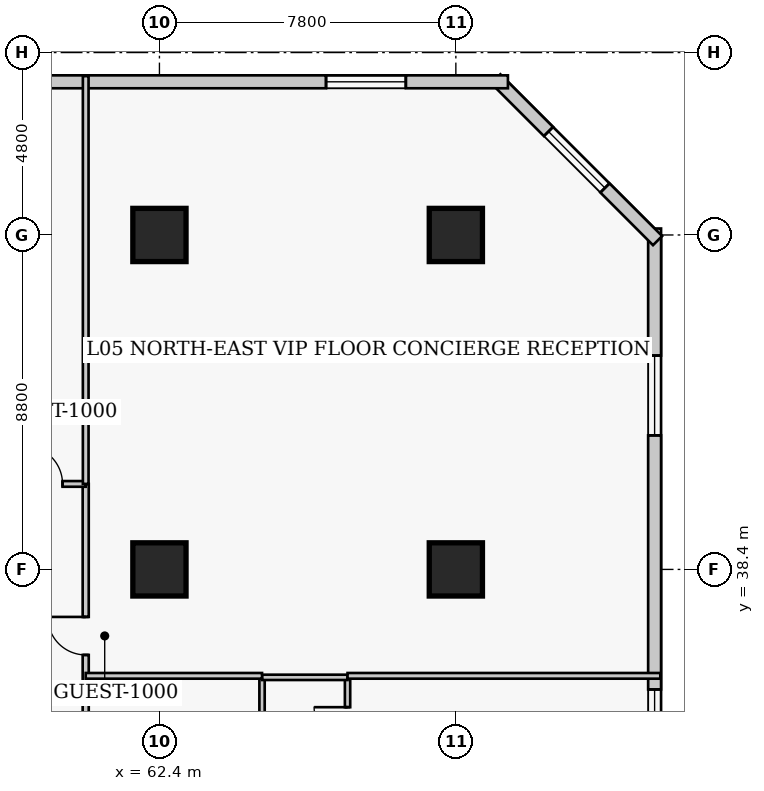
"""IFC4 building model, lengths in metres.
Left out: names, types, materials, properties, quantities, classifications, styles, units other than length and angle.
Written with IfcOpenShell. Run it as: python <this file> out.ifc"""

import sys

from ifc_helpers import new_model, si_unit, direction, frame, frame_2d, origin, origin_2d, place, context, subcontext, project, spatial, rectangle, extrude, element, fill, save


model = new_model("IFC4")
c1 = context("Model", 3, precision=1e-05, world=origin(), true_north=direction((0.0, 1.0)))
c2 = subcontext(c1, "Body", "Model", "MODEL_VIEW")
j1 = project(units=[si_unit("LENGTHUNIT", "METRE"), si_unit("PLANEANGLEUNIT", "RADIAN")], contexts=[c1])
p1 = place(None, origin())
s1 = spatial("IfcSite", under=j1, at=p1, CompositionType="ELEMENT")
p2 = place(p1, origin())
s2 = spatial("IfcBuilding", under=s1, at=p2, CompositionType="ELEMENT")
p3 = place(p2, frame((0.0, 0.0, 26.0)))
s3 = spatial("IfcBuildingStorey", under=s2, at=p3, CompositionType="ELEMENT", Elevation=26.0)
for number, where, z_axis, x_axis in (
    (1, (62.4, 38.4, 0.0), (0.0, 0.0, 1.0), (1.0, 0.0, 0.0)),
    (2, (62.4, 47.2, 0.0), (0.0, 0.0, 1.0), (1.0, 0.0, 0.0)),
    (3, (70.2, 38.4, 0.0), (0.0, 0.0, 1.0), (1.0, 0.0, 0.0)),
    (4, (70.2, 47.2, 0.0), (0.0, 0.0, 1.0), (1.0, 0.0, 0.0)),
):
    element("IfcColumn", number, at=place(p3, frame(where, z_axis=z_axis, x_axis=x_axis)), inside=s3, PredefinedType="COLUMN", context=c2, shape_type="SweptSolid", body=[
        extrude(rectangle(XDim=1.4, YDim=1.4, at=origin_2d()), origin(), (0.0, 0.0, 1.0), 3.8),
    ])
p4 = place(p3, frame((75.43, 12.23, 0.0), z_axis=(0.0, 0.0, 1.0), x_axis=(0.0, 1.0, 0.0)))
e5 = element("IfcWall", 5, at=p4, inside=s3, PredefinedType="SOLIDWALL", context=c2, shape_type="SweptSolid", body=[
    extrude(rectangle(XDim=35.14, YDim=0.34, at=frame_2d((17.57, 0.0))), origin(), (0.0, 0.0, 1.0), 3.54),
])
p5 = place(p4, frame((3.343, 0.0, 0.85)))
e6 = element("IfcOpeningElement", 6, at=p5, cuts=e5, PredefinedType="OPENING", context=c2, shape_type="SweptSolid", body=[
    extrude(rectangle(XDim=2.1, YDim=1.85, at=frame_2d((1.05, 0.925))), frame((0.0, 0.18, 0.0), z_axis=(0.0, -1.0, 0.0), x_axis=(1.0, 0.0, 0.0)), (0.0, 0.0, 1.0), 0.36),
])
p6 = place(p4, frame((12.127, 0.0, 0.85)))
e7 = element("IfcOpeningElement", 7, at=p6, cuts=e5, PredefinedType="OPENING", context=c2, shape_type="SweptSolid", body=[
    extrude(rectangle(XDim=2.1, YDim=1.85, at=frame_2d((1.05, 0.925))), frame((0.0, 0.18, 0.0), z_axis=(0.0, -1.0, 0.0), x_axis=(1.0, 0.0, 0.0)), (0.0, 0.0, 1.0), 0.36),
])
p7 = place(p4, frame((20.913, 0.0, 0.85)))
e8 = element("IfcOpeningElement", 8, at=p7, cuts=e5, PredefinedType="OPENING", context=c2, shape_type="SweptSolid", body=[
    extrude(rectangle(XDim=2.1, YDim=1.85, at=frame_2d((1.05, 0.925))), frame((0.0, 0.18, 0.0), z_axis=(0.0, -1.0, 0.0), x_axis=(1.0, 0.0, 0.0)), (0.0, 0.0, 1.0), 0.36),
])
p8 = place(p4, frame((29.698, 0.0, 0.85)))
e9 = element("IfcOpeningElement", 9, at=p8, cuts=e5, PredefinedType="OPENING", context=c2, shape_type="SweptSolid", body=[
    extrude(rectangle(XDim=2.1, YDim=1.85, at=frame_2d((1.05, 0.925))), frame((0.0, 0.18, 0.0), z_axis=(0.0, -1.0, 0.0), x_axis=(1.0, 0.0, 0.0)), (0.0, 0.0, 1.0), 0.36),
])
p9 = place(p3, frame((75.508, 47.052, 0.0), z_axis=(0.0, 0.0, 1.0), x_axis=(-0.707106781187, 0.707106781187, 0.0)))
e10 = element("IfcWall", 10, at=p9, inside=s3, PredefinedType="SOLIDWALL", context=c2, shape_type="SweptSolid", body=[
    extrude(rectangle(XDim=6.02, YDim=0.34, at=frame_2d((3.01, 0.0))), origin(), (0.0, 0.0, 1.0), 3.54),
])
p10 = place(p9, frame((1.96, 0.0, 0.85)))
e11 = element("IfcOpeningElement", 11, at=p10, cuts=e10, PredefinedType="OPENING", context=c2, shape_type="SweptSolid", body=[
    extrude(rectangle(XDim=2.1, YDim=1.85, at=frame_2d((1.05, 0.925))), frame((0.0, 0.18, 0.0), z_axis=(0.0, -1.0, 0.0), x_axis=(1.0, 0.0, 0.0)), (0.0, 0.0, 1.0), 0.36),
])
p11 = place(p3, frame((71.57, 51.23, 0.0), z_axis=(0.0, 0.0, 1.0), x_axis=(-1.0, 0.0, 0.0)))
e12 = element("IfcWall", 12, at=p11, inside=s3, PredefinedType="SOLIDWALL", context=c2, shape_type="SweptSolid", body=[
    extrude(rectangle(XDim=29.89, YDim=0.34, at=frame_2d((14.945, 0.0))), origin(), (0.0, 0.0, 1.0), 3.54),
])
p12 = place(p11, frame((2.686, 0.0, 0.85)))
e13 = element("IfcOpeningElement", 13, at=p12, cuts=e12, PredefinedType="OPENING", context=c2, shape_type="SweptSolid", body=[
    extrude(rectangle(XDim=2.1, YDim=1.85, at=frame_2d((1.05, 0.925))), frame((0.0, 0.18, 0.0), z_axis=(0.0, -1.0, 0.0), x_axis=(1.0, 0.0, 0.0)), (0.0, 0.0, 1.0), 0.36),
])
p13 = place(p11, frame((17.631, 0.0, 0.85)))
e14 = element("IfcOpeningElement", 14, at=p13, cuts=e12, PredefinedType="OPENING", context=c2, shape_type="SweptSolid", body=[
    extrude(rectangle(XDim=2.1, YDim=1.85, at=frame_2d((1.05, 0.925))), frame((0.0, 0.18, 0.0), z_axis=(0.0, -1.0, 0.0), x_axis=(1.0, 0.0, 0.0)), (0.0, 0.0, 1.0), 0.36),
])
p14 = place(p11, frame((25.104, 0.0, 0.85)))
e15 = element("IfcOpeningElement", 15, at=p14, cuts=e12, PredefinedType="OPENING", context=c2, shape_type="SweptSolid", body=[
    extrude(rectangle(XDim=2.1, YDim=1.85, at=frame_2d((1.05, 0.925))), frame((0.0, 0.18, 0.0), z_axis=(0.0, -1.0, 0.0), x_axis=(1.0, 0.0, 0.0)), (0.0, 0.0, 1.0), 0.36),
])
p15 = place(p3, frame((60.46, 10.25, 0.0), z_axis=(0.0, 0.0, 1.0), x_axis=(0.0, 1.0, 0.0)))
e16 = element("IfcWall", 16, at=p15, inside=s3, PredefinedType="PARTITIONING", context=c2, shape_type="SweptSolid", body=[
    extrude(rectangle(XDim=30.4, YDim=0.16, at=frame_2d((15.2, 0.0))), origin(), (0.0, 0.0, 1.0), 3.54),
])
p16 = place(p15, frame((4.4, 0.0, 0.0)))
e17 = element("IfcOpeningElement", 17, at=p16, cuts=e16, PredefinedType="OPENING", context=c2, shape_type="SweptSolid", body=[
    extrude(rectangle(XDim=0.95, YDim=2.1, at=frame_2d((0.475, 1.05))), frame((0.0, 0.09, 0.0), z_axis=(0.0, -1.0, 0.0), x_axis=(1.0, 0.0, 0.0)), (0.0, 0.0, 1.0), 0.18),
])
p17 = place(p15, frame((13.675, 0.0, 0.0)))
e18 = element("IfcOpeningElement", 18, at=p17, cuts=e16, PredefinedType="OPENING", context=c2, shape_type="SweptSolid", body=[
    extrude(rectangle(XDim=0.95, YDim=2.1, at=frame_2d((0.475, 1.05))), frame((0.0, 0.09, 0.0), z_axis=(0.0, -1.0, 0.0), x_axis=(1.0, 0.0, 0.0)), (0.0, 0.0, 1.0), 0.18),
])
p18 = place(p15, frame((21.475, 0.0, 0.0)))
e19 = element("IfcOpeningElement", 19, at=p18, cuts=e16, PredefinedType="OPENING", context=c2, shape_type="SweptSolid", body=[
    extrude(rectangle(XDim=0.95, YDim=2.1, at=frame_2d((0.475, 1.05))), frame((0.0, 0.09, 0.0), z_axis=(0.0, -1.0, 0.0), x_axis=(1.0, 0.0, 0.0)), (0.0, 0.0, 1.0), 0.18),
])
p19 = place(p15, frame((25.9, 0.0, 0.0)))
e20 = element("IfcOpeningElement", 20, at=p19, cuts=e16, PredefinedType="OPENING", context=c2, shape_type="SweptSolid", body=[
    extrude(rectangle(XDim=1.0, YDim=2.15, at=frame_2d((0.5, 1.075))), frame((0.0, 0.09, 0.0), z_axis=(0.0, -1.0, 0.0), x_axis=(1.0, 0.0, 0.0)), (0.0, 0.0, 1.0), 0.18),
])
p20 = place(p3, frame((56.8, 40.65, 0.0), z_axis=(0.0, 0.0, 1.0), x_axis=(1.0, 0.0, 0.0)))
e21 = element("IfcWall", 21, at=p20, inside=s3, PredefinedType="PARTITIONING", context=c2, shape_type="SweptSolid", body=[
    extrude(rectangle(XDim=3.66, YDim=0.15, at=frame_2d((1.83, 0.0))), origin(), (0.0, 0.0, 1.0), 3.54),
])
p21 = place(p20, frame((2.05, 0.0, 0.0)))
e22 = element("IfcOpeningElement", 22, at=p21, cuts=e21, PredefinedType="OPENING", context=c2, shape_type="SweptSolid", body=[
    extrude(rectangle(XDim=1.0, YDim=2.15, at=frame_2d((0.5, 1.075))), frame((0.0, 0.085, 0.0), z_axis=(0.0, -1.0, 0.0), x_axis=(1.0, 0.0, 0.0)), (0.0, 0.0, 1.0), 0.17),
])
p22 = place(p3, frame((60.46, 40.65, 0.0), z_axis=(0.0, 0.0, 1.0), x_axis=(0.0, 1.0, 0.0)))
e23 = element("IfcWall", 23, at=p22, inside=s3, PredefinedType="PARTITIONING", context=c2, shape_type="SweptSolid", body=[
    extrude(rectangle(XDim=10.73, YDim=0.15, at=frame_2d((5.365, 0.0))), origin(), (0.0, 0.0, 1.0), 3.54),
])
p23 = place(p3, frame((65.1, 33.11, 0.0), z_axis=(0.0, 0.0, 1.0), x_axis=(0.0, 1.0, 0.0)))
e24 = element("IfcWall", 24, at=p23, inside=s3, PredefinedType="PLUMBINGWALL", context=c2, shape_type="SweptSolid", body=[
    extrude(rectangle(XDim=2.45, YDim=0.14, at=frame_2d((1.225, 0.0))), origin(), (0.0, 0.0, 1.0), 3.54),
])
p24 = place(p3, frame((67.35, 33.11, 0.0), z_axis=(0.0, 0.0, 1.0), x_axis=(0.0, 1.0, 0.0)))
e25 = element("IfcWall", 25, at=p24, inside=s3, PredefinedType="PLUMBINGWALL", context=c2, shape_type="SweptSolid", body=[
    extrude(rectangle(XDim=2.45, YDim=0.14, at=frame_2d((1.225, 0.0))), origin(), (0.0, 0.0, 1.0), 3.54),
])
p25 = place(p24, frame((0.785, 0.0, 0.0)))
e26 = element("IfcOpeningElement", 26, at=p25, cuts=e25, PredefinedType="OPENING", context=c2, shape_type="SweptSolid", body=[
    extrude(rectangle(XDim=0.88, YDim=2.05, at=frame_2d((0.44, 1.025))), frame((0.0, 0.08, 0.0), z_axis=(0.0, -1.0, 0.0), x_axis=(1.0, 0.0, 0.0)), (0.0, 0.0, 1.0), 0.16),
])
p26 = place(p3, frame((65.1, 35.56, 0.0), z_axis=(0.0, 0.0, 1.0), x_axis=(1.0, 0.0, 0.0)))
e27 = element("IfcWall", 27, at=p26, inside=s3, PredefinedType="PLUMBINGWALL", context=c2, shape_type="SweptSolid", body=[
    extrude(rectangle(XDim=2.25, YDim=0.14, at=frame_2d((1.125, 0.0))), origin(), (0.0, 0.0, 1.0), 3.54),
])
p27 = place(p3, frame((60.46, 35.6, 0.0), z_axis=(0.0, 0.0, 1.0), x_axis=(1.0, 0.0, 0.0)))
e28 = element("IfcWall", 28, at=p27, inside=s3, PredefinedType="PARTITIONING", context=c2, shape_type="SweptSolid", body=[
    extrude(rectangle(XDim=4.64, YDim=0.15, at=frame_2d((2.32, 0.0))), origin(), (0.0, 0.0, 1.0), 3.54),
])
p28 = place(p3, frame((67.35, 35.6, 0.0), z_axis=(0.0, 0.0, 1.0), x_axis=(1.0, 0.0, 0.0)))
e29 = element("IfcWall", 29, at=p28, inside=s3, PredefinedType="PARTITIONING", context=c2, shape_type="SweptSolid", body=[
    extrude(rectangle(XDim=8.23, YDim=0.15, at=frame_2d((4.115, 0.0))), origin(), (0.0, 0.0, 1.0), 3.54),
])
p29 = place(p7, origin())
e30 = element("IfcWindow", 30, at=p29, inside=s3, PartitioningType="SINGLE_PANEL", PredefinedType="WINDOW", context=c2, shape_type="SweptSolid", body=[
    extrude(rectangle(XDim=2.1, YDim=1.85, at=frame_2d((1.05, 0.925))), frame((0.0, 0.03, 0.0), z_axis=(0.0, -1.0, 0.0), x_axis=(1.0, 0.0, 0.0)), (0.0, 0.0, 1.0), 0.06),
])
fill(e8, e30)
p30 = place(p8, origin())
e31 = element("IfcWindow", 31, at=p30, inside=s3, PartitioningType="SINGLE_PANEL", PredefinedType="WINDOW", context=c2, shape_type="SweptSolid", body=[
    extrude(rectangle(XDim=2.1, YDim=1.85, at=frame_2d((1.05, 0.925))), frame((0.0, 0.03, 0.0), z_axis=(0.0, -1.0, 0.0), x_axis=(1.0, 0.0, 0.0)), (0.0, 0.0, 1.0), 0.06),
])
fill(e9, e31)
p31 = place(p10, origin())
e32 = element("IfcWindow", 32, at=p31, inside=s3, PartitioningType="SINGLE_PANEL", PredefinedType="WINDOW", context=c2, shape_type="SweptSolid", body=[
    extrude(rectangle(XDim=2.1, YDim=1.85, at=frame_2d((1.05, 0.925))), frame((0.0, 0.03, 0.0), z_axis=(0.0, -1.0, 0.0), x_axis=(1.0, 0.0, 0.0)), (0.0, 0.0, 1.0), 0.06),
])
fill(e11, e32)
p32 = place(p12, origin())
e33 = element("IfcWindow", 33, at=p32, inside=s3, PartitioningType="SINGLE_PANEL", PredefinedType="WINDOW", context=c2, shape_type="SweptSolid", body=[
    extrude(rectangle(XDim=2.1, YDim=1.85, at=frame_2d((1.05, 0.925))), frame((0.0, 0.03, 0.0), z_axis=(0.0, -1.0, 0.0), x_axis=(1.0, 0.0, 0.0)), (0.0, 0.0, 1.0), 0.06),
])
fill(e13, e33)
p33 = place(p21, origin())
e34 = element("IfcDoor", 34, at=p33, inside=s3, OperationType="SINGLE_SWING_LEFT", PredefinedType="DOOR", context=c2, shape_type="SweptSolid", body=[
    extrude(rectangle(XDim=1.0, YDim=2.15, at=frame_2d((0.5, 1.075))), frame((0.0, 0.025, 0.0), z_axis=(0.0, -1.0, 0.0), x_axis=(1.0, 0.0, 0.0)), (0.0, 0.0, 1.0), 0.05),
])
fill(e22, e34)
p34 = place(p25, origin())
e35 = element("IfcDoor", 35, at=p34, inside=s3, OperationType="SINGLE_SWING_RIGHT", PredefinedType="DOOR", context=c2, shape_type="SweptSolid", body=[
    extrude(rectangle(XDim=0.88, YDim=2.05, at=frame_2d((0.44, 1.025))), frame((0.0, 0.025, 0.0), z_axis=(0.0, -1.0, 0.0), x_axis=(1.0, 0.0, 0.0)), (0.0, 0.0, 1.0), 0.05),
])
fill(e26, e35)
p35 = place(p19, origin())
e36 = element("IfcDoor", 36, at=p35, inside=s3, OperationType="SINGLE_SWING_RIGHT", PredefinedType="DOOR", context=c2, shape_type="SweptSolid", body=[
    extrude(rectangle(XDim=1.0, YDim=2.15, at=frame_2d((0.5, 1.075))), frame((0.0, 0.025, 0.0), z_axis=(0.0, -1.0, 0.0), x_axis=(1.0, 0.0, 0.0)), (0.0, 0.0, 1.0), 0.05),
])
fill(e20, e36)
save(model, sys.argv[1])
